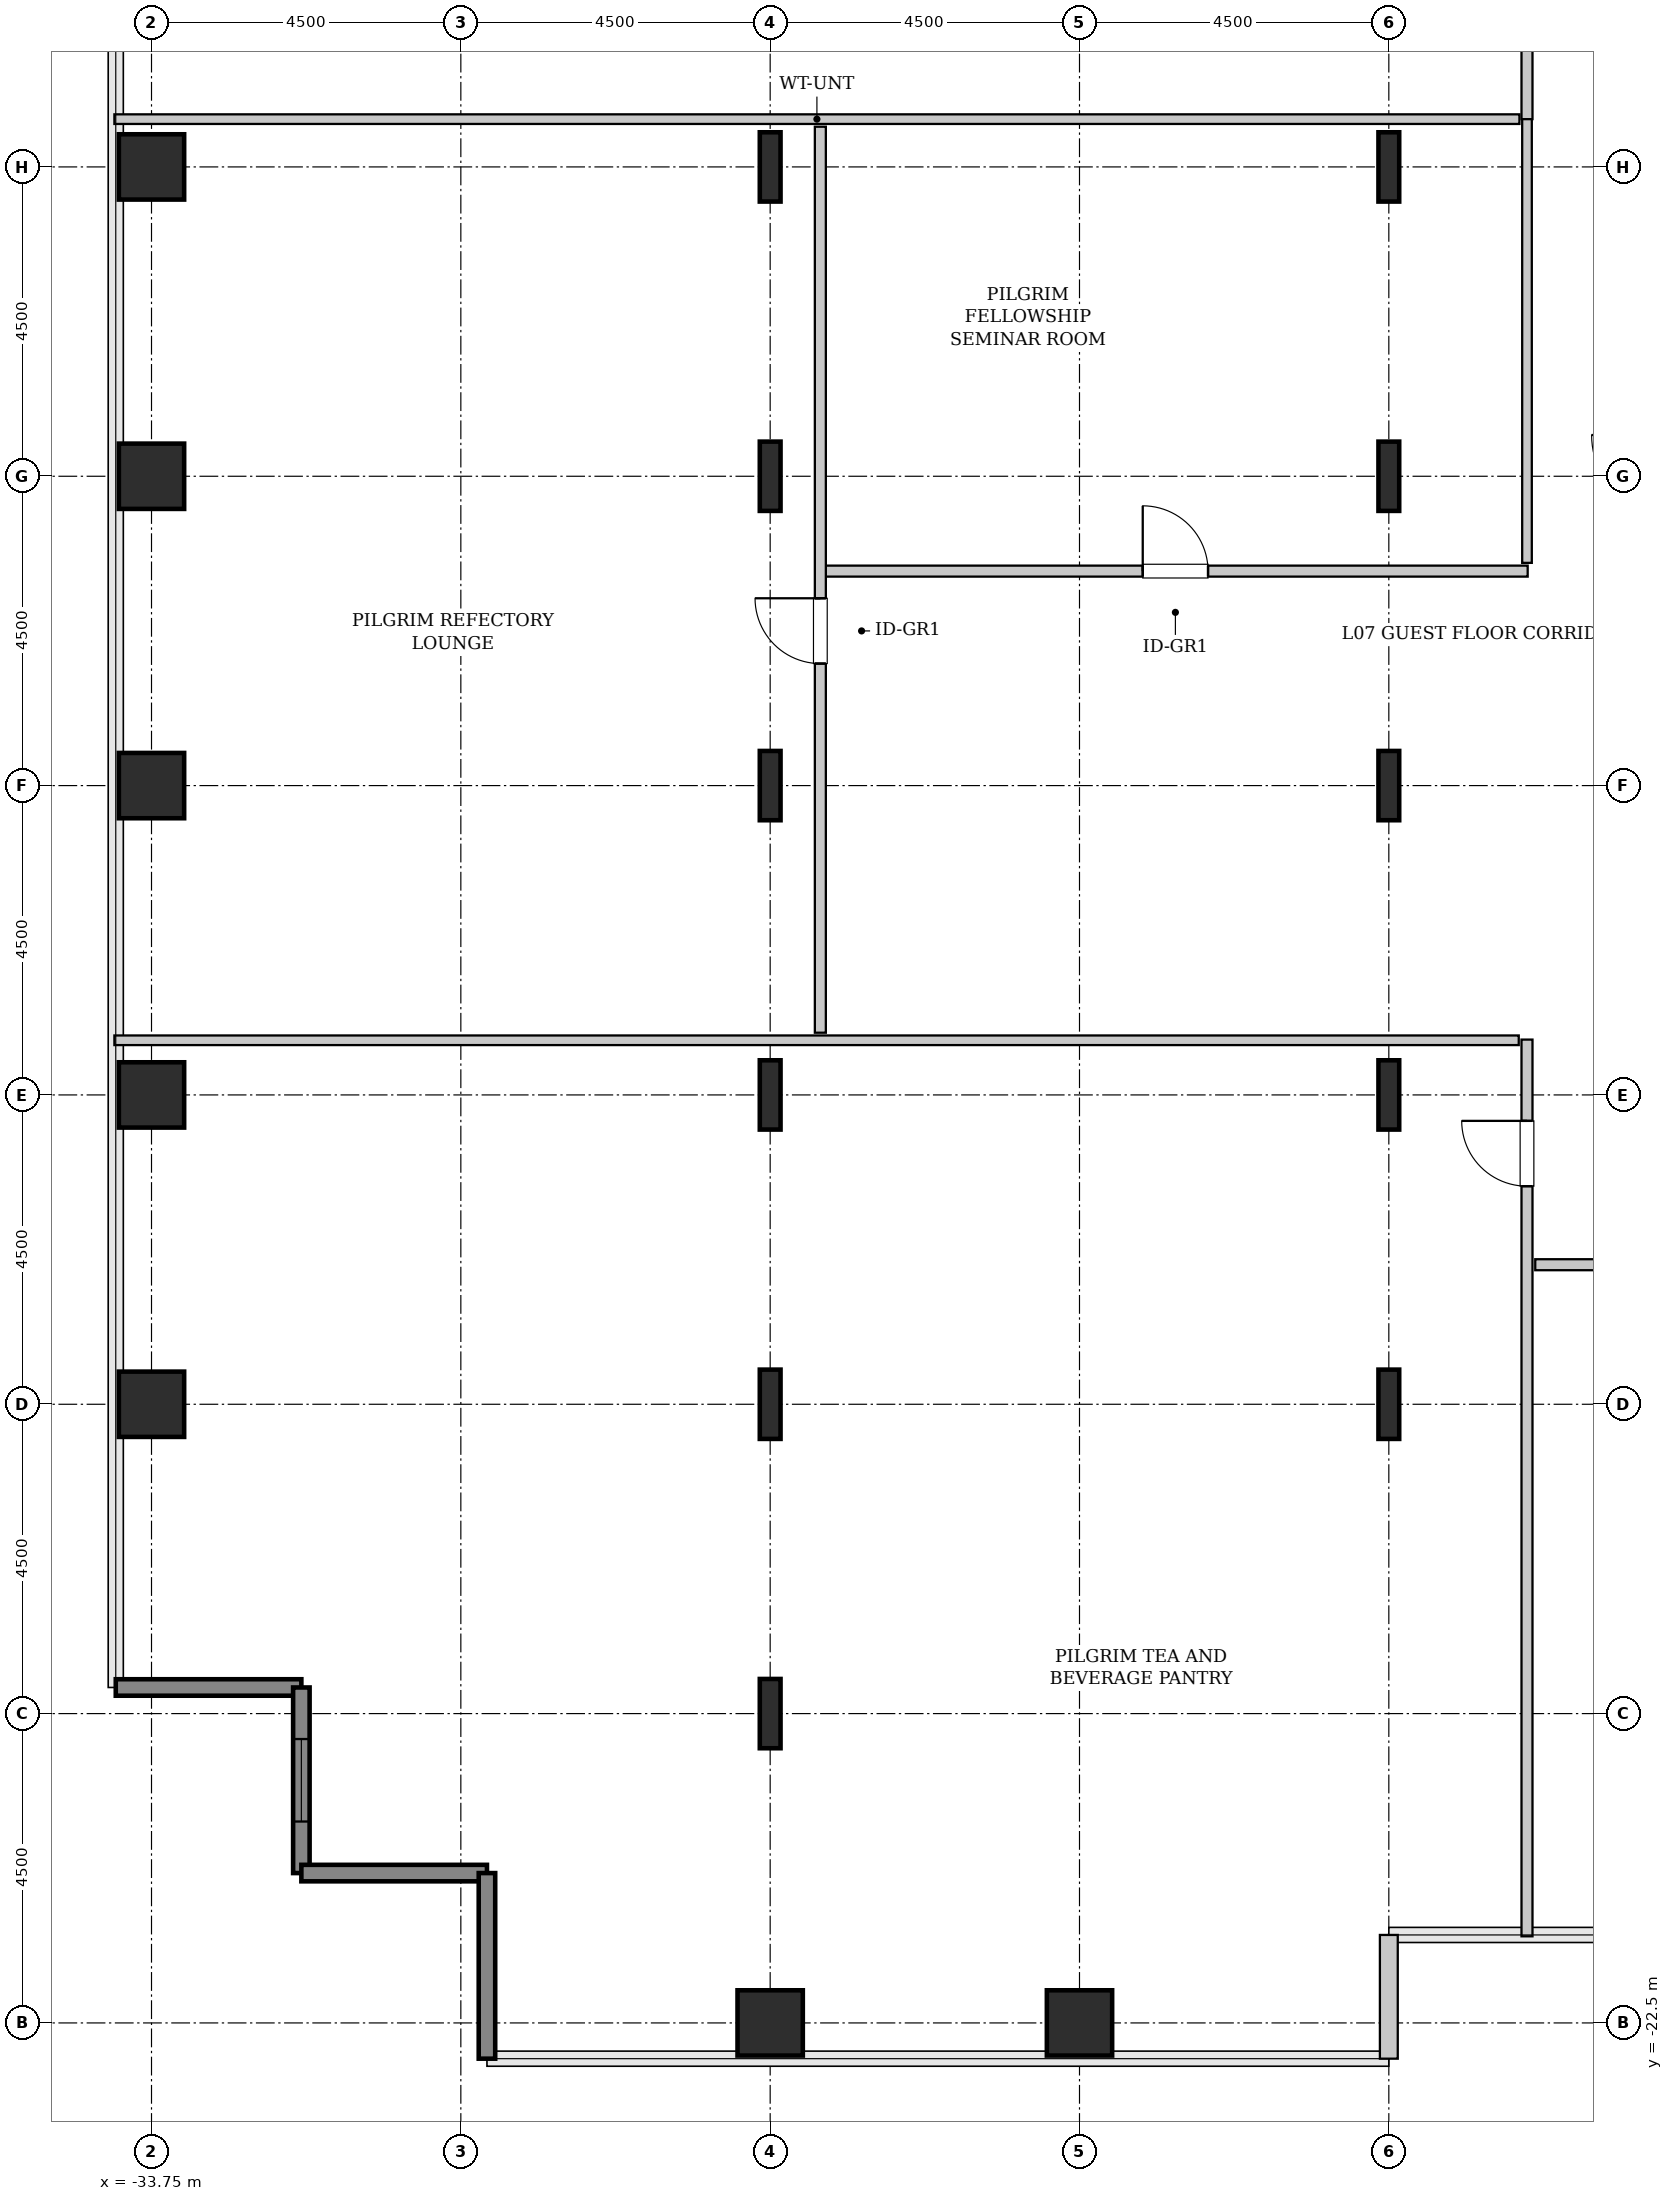
"""IFC4 building model, lengths in metres.
Left out: names, types, materials, properties, quantities, classifications, styles, units other than length and angle.
Written with IfcOpenShell. Run it as: python <this file> out.ifc"""

import sys

from ifc_helpers import new_model, si_unit, direction, frame, frame_2d, origin, origin_2d, place, context, subcontext, project, spatial, rectangle, hollow_rectangle, i_section, extrude, source, transform, mapped, element, fill, save


model = new_model("IFC4")
c1 = context("Model", 3, precision=1e-05, world=origin(), true_north=direction((0.0, 1.0)))
c2 = subcontext(c1, "Body", "Model", "MODEL_VIEW")
j1 = project(units=[si_unit("LENGTHUNIT", "METRE"), si_unit("PLANEANGLEUNIT", "RADIAN")], contexts=[c1])
p1 = place(None, origin())
s1 = spatial("IfcSite", under=j1, at=p1, CompositionType="ELEMENT")
p2 = place(p1, origin())
s2 = spatial("IfcBuilding", under=s1, at=p2, CompositionType="ELEMENT")
p3 = place(p2, frame((0.0, 0.0, 36.8)))
s3 = spatial("IfcBuildingStorey", under=s2, at=p3, CompositionType="ELEMENT", Elevation=36.8)
m1 = source(origin(), c2, "Body", "SweptSolid", [
    extrude(hollow_rectangle(XDim=0.95, YDim=0.95, WallThickness=0.045, InnerFilletRadius=0.045, OuterFilletRadius=0.09, at=origin_2d()), origin(), (0.0, 0.0, 1.0), 3.8),
])
for number, where, z_axis, x_axis in (
    (1, (-33.75, -13.5, 0.0), (0.0, 0.0, 1.0), (1.0, 0.0, 0.0)),
    (2, (-33.75, -9.0, 0.0), (0.0, 0.0, 1.0), (1.0, 0.0, 0.0)),
    (3, (-33.75, -4.5, 0.0), (0.0, 0.0, 1.0), (1.0, 0.0, 0.0)),
    (4, (-33.75, 0.0, 0.0), (0.0, 0.0, 1.0), (1.0, 0.0, 0.0)),
    (5, (-33.75, 4.5, 0.0), (0.0, 0.0, 1.0), (1.0, 0.0, 0.0)),
    (6, (-24.75, -22.5, 0.0), (0.0, 0.0, 1.0), (1.0, 0.0, 0.0)),
):
    element("IfcColumn", number, at=place(p3, frame(where, z_axis=z_axis, x_axis=x_axis)), inside=s3, PredefinedType="COLUMN", context=c2, shape_type="MappedRepresentation", body=[
        mapped(m1, transform((0.0, 0.0, 0.0), x_axis=(1.0, 0.0, 0.0), y_axis=(0.0, 1.0, 0.0), z_axis=(0.0, 0.0, 1.0), scale=1.0)),
    ])
m2 = source(origin(), c2, "Body", "SweptSolid", [
    extrude(i_section(OverallWidth=0.302, OverallDepth=1.008, WebThickness=0.021, FlangeThickness=0.04, FilletRadius=0.03, at=origin_2d()), origin(), (0.0, 0.0, 1.0), 3.8),
])
for number, where, z_axis, x_axis in (
    (7, (-24.75, -18.0, 0.0), (0.0, 0.0, 1.0), (1.0, 0.0, 0.0)),
    (8, (-24.75, -13.5, 0.0), (0.0, 0.0, 1.0), (1.0, 0.0, 0.0)),
    (9, (-24.75, -9.0, 0.0), (0.0, 0.0, 1.0), (1.0, 0.0, 0.0)),
    (10, (-24.75, -4.5, 0.0), (0.0, 0.0, 1.0), (1.0, 0.0, 0.0)),
    (11, (-24.75, 0.0, 0.0), (0.0, 0.0, 1.0), (1.0, 0.0, 0.0)),
    (12, (-24.75, 4.5, 0.0), (0.0, 0.0, 1.0), (1.0, 0.0, 0.0)),
):
    element("IfcColumn", number, at=place(p3, frame(where, z_axis=z_axis, x_axis=x_axis)), inside=s3, PredefinedType="COLUMN", context=c2, shape_type="MappedRepresentation", body=[
        mapped(m2, transform((0.0, 0.0, 0.0), x_axis=(1.0, 0.0, 0.0), y_axis=(0.0, 1.0, 0.0), z_axis=(0.0, 0.0, 1.0), scale=1.0)),
    ])
p4 = place(p3, frame((-20.25, -22.5, 0.0), z_axis=(0.0, 0.0, 1.0), x_axis=(1.0, 0.0, 0.0)))
e13 = element("IfcColumn", 13, at=p4, inside=s3, PredefinedType="COLUMN", context=c2, shape_type="MappedRepresentation", body=[
    mapped(m1, transform((0.0, 0.0, 0.0), x_axis=(1.0, 0.0, 0.0), y_axis=(0.0, 1.0, 0.0), z_axis=(0.0, 0.0, 1.0), scale=1.0)),
])
for number, where, z_axis, x_axis in (
    (14, (-15.75, -13.5, 0.0), (0.0, 0.0, 1.0), (1.0, 0.0, 0.0)),
    (15, (-15.75, -9.0, 0.0), (0.0, 0.0, 1.0), (1.0, 0.0, 0.0)),
    (16, (-15.75, -4.5, 0.0), (0.0, 0.0, 1.0), (1.0, 0.0, 0.0)),
    (17, (-15.75, 0.0, 0.0), (0.0, 0.0, 1.0), (1.0, 0.0, 0.0)),
    (18, (-15.75, 4.5, 0.0), (0.0, 0.0, 1.0), (1.0, 0.0, 0.0)),
):
    element("IfcColumn", number, at=place(p3, frame(where, z_axis=z_axis, x_axis=x_axis)), inside=s3, PredefinedType="COLUMN", context=c2, shape_type="MappedRepresentation", body=[
        mapped(m2, transform((0.0, 0.0, 0.0), x_axis=(1.0, 0.0, 0.0), y_axis=(0.0, 1.0, 0.0), z_axis=(0.0, 0.0, 1.0), scale=1.0)),
    ])
m3 = source(origin(), c2, "Body", "SweptSolid", [
    extrude(rectangle(XDim=2.7, YDim=0.24, at=frame_2d((1.35, 0.0))), origin(), (0.0, 0.0, 1.0), 3.55),
])
p5 = place(p3, frame((-34.27, -17.62, 0.0), z_axis=(0.0, 0.0, 1.0), x_axis=(1.0, 0.0, 0.0)))
e19 = element("IfcWall", 19, at=p5, inside=s3, PredefinedType="SHEAR", context=c2, shape_type="MappedRepresentation", body=[
    mapped(m3, transform((0.0, 0.0, 0.0), x_axis=(1.0, 0.0, 0.0), y_axis=(0.0, 1.0, 0.0), z_axis=(0.0, 0.0, 1.0), scale=1.0)),
])
p6 = place(p3, frame((-31.57, -17.62, 0.0), z_axis=(0.0, 0.0, 1.0), x_axis=(0.0, -1.0, 0.0)))
e20 = element("IfcWall", 20, at=p6, inside=s3, PredefinedType="SHEAR", context=c2, shape_type="MappedRepresentation", body=[
    mapped(m3, transform((0.0, 0.0, 0.0), x_axis=(1.0, 0.0, 0.0), y_axis=(0.0, 1.0, 0.0), z_axis=(0.0, 0.0, 1.0), scale=1.0)),
])
p7 = place(p6, frame((0.75, 0.0, 0.85)))
e21 = element("IfcOpeningElement", 21, at=p7, cuts=e20, PredefinedType="OPENING", context=c2, shape_type="SweptSolid", body=[
    extrude(rectangle(XDim=1.2, YDim=1.8, at=frame_2d((0.6, 0.9))), frame((0.0, 0.13, 0.0), z_axis=(0.0, -1.0, 0.0), x_axis=(1.0, 0.0, 0.0)), (0.0, 0.0, 1.0), 0.26),
])
for number, where, z_axis, x_axis in (
    (22, (-31.57, -20.32, 0.0), (0.0, 0.0, 1.0), (1.0, 0.0, 0.0)),
    (23, (-28.87, -20.32, 0.0), (0.0, 0.0, 1.0), (0.0, -1.0, 0.0)),
):
    element("IfcWall", number, at=place(p3, frame(where, z_axis=z_axis, x_axis=x_axis)), inside=s3, PredefinedType="SHEAR", context=c2, shape_type="MappedRepresentation", body=[
        mapped(m3, transform((0.0, 0.0, 0.0), x_axis=(1.0, 0.0, 0.0), y_axis=(0.0, 1.0, 0.0), z_axis=(0.0, 0.0, 1.0), scale=1.0)),
    ])
m4 = source(origin(), c2, "Body", "SweptSolid", [
    extrude(rectangle(XDim=1.8, YDim=0.26, at=frame_2d((0.9, 0.0))), origin(), (0.0, 0.0, 1.0), 3.55),
])
p8 = place(p3, frame((-15.75, -23.02, 0.0), z_axis=(0.0, 0.0, 1.0), x_axis=(0.0, 1.0, 0.0)))
e24 = element("IfcWall", 24, at=p8, inside=s3, PredefinedType="SOLIDWALL", context=c2, shape_type="MappedRepresentation", body=[
    mapped(m4, transform((0.0, 0.0, 0.0), x_axis=(1.0, 0.0, 0.0), y_axis=(0.0, 1.0, 0.0), z_axis=(0.0, 0.0, 1.0), scale=1.0)),
])
m5 = source(origin(), c2, "Body", "SweptSolid", [
    extrude(rectangle(XDim=13.045, YDim=0.16, at=frame_2d((6.522, 0.0))), origin(), (0.0, 0.0, 1.0), 3.535),
])
p9 = place(p3, frame((-13.74, -21.24, 0.0), z_axis=(0.0, 0.0, 1.0), x_axis=(0.0, 1.0, 0.0)))
e25 = element("IfcWall", 25, at=p9, inside=s3, PredefinedType="PARTITIONING", context=c2, shape_type="MappedRepresentation", body=[
    mapped(m5, transform((0.0, 0.0, 0.0), x_axis=(1.0, 0.0, 0.0), y_axis=(0.0, 1.0, 0.0), z_axis=(0.0, 0.0, 1.0), scale=1.0)),
])
p10 = place(p9, frame((10.913, 0.0, 0.0)))
e26 = element("IfcOpeningElement", 26, at=p10, cuts=e25, PredefinedType="OPENING", context=c2, shape_type="SweptSolid", body=[
    extrude(rectangle(XDim=0.95, YDim=2.1, at=frame_2d((0.475, 1.05))), frame((0.0, 0.09, 0.0), z_axis=(0.0, -1.0, 0.0), x_axis=(1.0, 0.0, 0.0)), (0.0, 0.0, 1.0), 0.18),
])
m6 = source(origin(), c2, "Body", "SweptSolid", [
    extrude(rectangle(XDim=20.43, YDim=0.14, at=frame_2d((10.215, 0.0))), origin(), (0.0, 0.0, 1.0), 3.535),
])
p11 = place(p3, frame((-34.29, -8.205, 0.0), z_axis=(0.0, 0.0, 1.0), x_axis=(1.0, 0.0, 0.0)))
e27 = element("IfcWall", 27, at=p11, inside=s3, PredefinedType="PARTITIONING", context=c2, shape_type="MappedRepresentation", body=[
    mapped(m6, transform((0.0, 0.0, 0.0), x_axis=(1.0, 0.0, 0.0), y_axis=(0.0, 1.0, 0.0), z_axis=(0.0, 0.0, 1.0), scale=1.0)),
])
m7 = source(origin(), c2, "Body", "SweptSolid", [
    extrude(rectangle(XDim=10.25, YDim=0.16, at=frame_2d((5.125, 0.0))), origin(), (0.0, 0.0, 1.0), 3.535),
])
p12 = place(p3, frame((-23.98, -1.38, 0.0), z_axis=(0.0, 0.0, 1.0), x_axis=(1.0, 0.0, 0.0)))
e28 = element("IfcWall", 28, at=p12, inside=s3, PredefinedType="PARTITIONING", context=c2, shape_type="MappedRepresentation", body=[
    mapped(m7, transform((0.0, 0.0, 0.0), x_axis=(1.0, 0.0, 0.0), y_axis=(0.0, 1.0, 0.0), z_axis=(0.0, 0.0, 1.0), scale=1.0)),
])
p13 = place(p12, frame((4.65, 0.0, 0.0)))
e29 = element("IfcOpeningElement", 29, at=p13, cuts=e28, PredefinedType="OPENING", context=c2, shape_type="SweptSolid", body=[
    extrude(rectangle(XDim=0.95, YDim=2.1, at=frame_2d((0.475, 1.05))), frame((0.0, 0.09, 0.0), z_axis=(0.0, -1.0, 0.0), x_axis=(1.0, 0.0, 0.0)), (0.0, 0.0, 1.0), 0.18),
])
m8 = source(origin(), c2, "Body", "SweptSolid", [
    extrude(rectangle(XDim=6.465, YDim=0.14, at=frame_2d((3.232, 0.0))), origin(), (0.0, 0.0, 1.0), 3.535),
])
p14 = place(p3, frame((-13.74, -1.26, 0.0), z_axis=(0.0, 0.0, 1.0), x_axis=(0.0, 1.0, 0.0)))
e30 = element("IfcWall", 30, at=p14, inside=s3, PredefinedType="PARTITIONING", context=c2, shape_type="MappedRepresentation", body=[
    mapped(m8, transform((0.0, 0.0, 0.0), x_axis=(1.0, 0.0, 0.0), y_axis=(0.0, 1.0, 0.0), z_axis=(0.0, 0.0, 1.0), scale=1.0)),
])
m9 = source(origin(), c2, "Body", "SweptSolid", [
    extrude(rectangle(XDim=20.44, YDim=0.14, at=frame_2d((10.22, 0.0))), origin(), (0.0, 0.0, 1.0), 3.535),
])
p15 = place(p3, frame((-34.29, 5.195, 0.0), z_axis=(0.0, 0.0, 1.0), x_axis=(1.0, 0.0, 0.0)))
e31 = element("IfcWall", 31, at=p15, inside=s3, PredefinedType="PARTITIONING", context=c2, shape_type="MappedRepresentation", body=[
    mapped(m9, transform((0.0, 0.0, 0.0), x_axis=(1.0, 0.0, 0.0), y_axis=(0.0, 1.0, 0.0), z_axis=(0.0, 0.0, 1.0), scale=1.0)),
])
m10 = source(origin(), c2, "Body", "SweptSolid", [
    extrude(rectangle(XDim=13.18, YDim=0.16, at=frame_2d((6.59, 0.0))), origin(), (0.0, 0.0, 1.0), 3.535),
])
p16 = place(p3, frame((-24.02, -8.095, 0.0), z_axis=(0.0, 0.0, 1.0), x_axis=(0.0, 1.0, 0.0)))
e32 = element("IfcWall", 32, at=p16, inside=s3, PredefinedType="PARTITIONING", context=c2, shape_type="MappedRepresentation", body=[
    mapped(m10, transform((0.0, 0.0, 0.0), x_axis=(1.0, 0.0, 0.0), y_axis=(0.0, 1.0, 0.0), z_axis=(0.0, 0.0, 1.0), scale=1.0)),
])
p17 = place(p16, frame((5.37, 0.0, 0.0)))
e33 = element("IfcOpeningElement", 33, at=p17, cuts=e32, PredefinedType="OPENING", context=c2, shape_type="SweptSolid", body=[
    extrude(rectangle(XDim=0.95, YDim=2.1, at=frame_2d((0.475, 1.05))), frame((0.0, 0.09, 0.0), z_axis=(0.0, -1.0, 0.0), x_axis=(1.0, 0.0, 0.0)), (0.0, 0.0, 1.0), 0.18),
])
m11 = source(origin(), c2, "Body", "SweptSolid", [
    extrude(rectangle(XDim=16.045, YDim=0.16, at=frame_2d((8.022, 0.0))), origin(), (0.0, 0.0, 1.0), 3.535),
])
p18 = place(p3, frame((-13.74, 5.195, 0.0), z_axis=(0.0, 0.0, 1.0), x_axis=(0.0, 1.0, 0.0)))
e34 = element("IfcWall", 34, at=p18, inside=s3, PredefinedType="PARTITIONING", context=c2, shape_type="MappedRepresentation", body=[
    mapped(m11, transform((0.0, 0.0, 0.0), x_axis=(1.0, 0.0, 0.0), y_axis=(0.0, 1.0, 0.0), z_axis=(0.0, 0.0, 1.0), scale=1.0)),
])
p19 = place(p18, frame((2.683, 0.0, 0.0)))
e35 = element("IfcOpeningElement", 35, at=p19, cuts=e34, PredefinedType="OPENING", context=c2, shape_type="SweptSolid", body=[
    extrude(rectangle(XDim=0.95, YDim=2.1, at=frame_2d((0.475, 1.05))), frame((0.0, 0.09, 0.0), z_axis=(0.0, -1.0, 0.0), x_axis=(1.0, 0.0, 0.0)), (0.0, 0.0, 1.0), 0.18),
])
m12 = source(origin(), c2, "Body", "SweptSolid", [
    extrude(rectangle(XDim=4.425, YDim=0.16, at=frame_2d((2.212, 0.0))), origin(), (0.0, 0.0, 1.0), 3.535),
])
p20 = place(p3, frame((-13.62, -11.47, 0.0), z_axis=(0.0, 0.0, 1.0), x_axis=(1.0, 0.0, 0.0)))
e36 = element("IfcWall", 36, at=p20, inside=s3, PredefinedType="PARTITIONING", context=c2, shape_type="MappedRepresentation", body=[
    mapped(m12, transform((0.0, 0.0, 0.0), x_axis=(1.0, 0.0, 0.0), y_axis=(0.0, 1.0, 0.0), z_axis=(0.0, 0.0, 1.0), scale=1.0)),
])
p21 = place(p20, frame((1.738, 0.0, 0.0)))
e37 = element("IfcOpeningElement", 37, at=p21, cuts=e36, PredefinedType="OPENING", context=c2, shape_type="SweptSolid", body=[
    extrude(rectangle(XDim=0.95, YDim=2.1, at=frame_2d((0.475, 1.05))), frame((0.0, 0.09, 0.0), z_axis=(0.0, -1.0, 0.0), x_axis=(1.0, 0.0, 0.0)), (0.0, 0.0, 1.0), 0.18),
])
m13 = source(origin(), c2, "Body", "SweptSolid", [
    extrude(rectangle(XDim=1.2, YDim=1.8, at=frame_2d((0.6, 0.9))), frame((0.0, 0.03, 0.0), z_axis=(0.0, -1.0, 0.0), x_axis=(1.0, 0.0, 0.0)), (0.0, 0.0, 1.0), 0.06),
])
p22 = place(p7, origin())
e38 = element("IfcWindow", 38, at=p22, inside=s3, PartitioningType="SINGLE_PANEL", PredefinedType="WINDOW", context=c2, shape_type="MappedRepresentation", body=[
    mapped(m13, transform((0.0, 0.0, 0.0), x_axis=(1.0, 0.0, 0.0), y_axis=(0.0, 1.0, 0.0), z_axis=(0.0, 0.0, 1.0), scale=1.0)),
])
fill(e21, e38)
m14 = source(origin(), c2, "Body", "SweptSolid", [
    extrude(rectangle(XDim=0.95, YDim=2.1, at=frame_2d((0.475, 1.05))), frame((0.0, 0.025, 0.0), z_axis=(0.0, -1.0, 0.0), x_axis=(1.0, 0.0, 0.0)), (0.0, 0.0, 1.0), 0.05),
])
p23 = place(p10, origin())
e39 = element("IfcDoor", 39, at=p23, inside=s3, OperationType="SINGLE_SWING_RIGHT", PredefinedType="DOOR", context=c2, shape_type="MappedRepresentation", body=[
    mapped(m14, transform((0.0, 0.0, 0.0), x_axis=(1.0, 0.0, 0.0), y_axis=(0.0, 1.0, 0.0), z_axis=(0.0, 0.0, 1.0), scale=1.0)),
])
fill(e26, e39)
p24 = place(p13, origin())
e40 = element("IfcDoor", 40, at=p24, inside=s3, OperationType="SINGLE_SWING_LEFT", PredefinedType="DOOR", context=c2, shape_type="MappedRepresentation", body=[
    mapped(m14, transform((0.0, 0.0, 0.0), x_axis=(1.0, 0.0, 0.0), y_axis=(0.0, 1.0, 0.0), z_axis=(0.0, 0.0, 1.0), scale=1.0)),
])
fill(e29, e40)
p25 = place(p17, origin())
e41 = element("IfcDoor", 41, at=p25, inside=s3, OperationType="SINGLE_SWING_RIGHT", PredefinedType="DOOR", context=c2, shape_type="MappedRepresentation", body=[
    mapped(m14, transform((0.0, 0.0, 0.0), x_axis=(1.0, 0.0, 0.0), y_axis=(0.0, 1.0, 0.0), z_axis=(0.0, 0.0, 1.0), scale=1.0)),
])
fill(e33, e41)
save(model, sys.argv[1])
